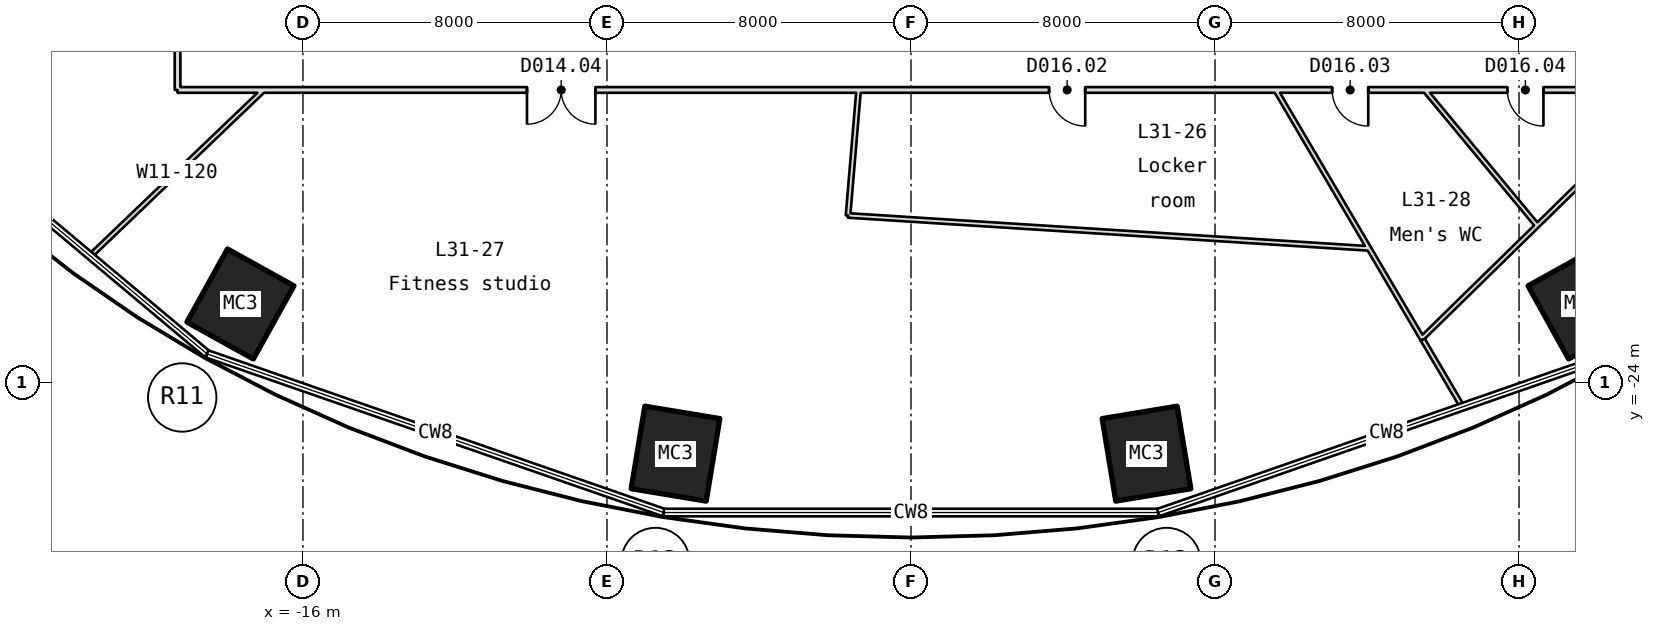
"""IFC4 building model, lengths in metres.
Left out: names, types, materials, properties, quantities, classifications, styles, units other than length and angle.
Written with IfcOpenShell. Run it as: python <this file> out.ifc"""

import sys

from ifc_helpers import new_model, si_unit, direction, frame, frame_2d, origin, origin_2d, place, context, subcontext, project, spatial, rectangle, hollow_rectangle, extrude, element, fill, save


model = new_model("IFC4")
c1 = context("Model", 3, precision=1e-05, world=origin(), true_north=direction((0.0, 1.0)))
c2 = subcontext(c1, "Body", "Model", "MODEL_VIEW")
j1 = project(units=[si_unit("LENGTHUNIT", "METRE"), si_unit("PLANEANGLEUNIT", "RADIAN")], contexts=[c1])
p1 = place(None, origin())
s1 = spatial("IfcSite", under=j1, at=p1, CompositionType="ELEMENT")
p2 = place(p1, origin())
s2 = spatial("IfcBuilding", under=s1, at=p2, CompositionType="ELEMENT")
p3 = place(p2, frame((0.0, 0.0, 145.05)))
s3 = spatial("IfcBuildingStorey", under=s2, at=p3, CompositionType="ELEMENT", Elevation=145.05)
for number, where, z_axis, x_axis in (
    (1, (-17.646, -21.932, -0.2), (0.0, 0.0, 1.0), (-0.874, 0.485, 0.0)),
    (2, (-6.197, -25.87, -0.2), (0.0, 0.0, 1.0), (-0.987, 0.163, 0.0)),
    (3, (6.197, -25.87, -0.2), (0.0, 0.0, 1.0), (-0.987, -0.163, 0.0)),
    (4, (17.646, -21.932, -0.2), (0.0, 0.0, 1.0), (-0.874, -0.485, 0.0)),
):
    element("IfcColumn", number, at=place(p3, frame(where, z_axis=z_axis, x_axis=x_axis)), inside=s3, PredefinedType="COLUMN", context=c2, shape_type="SweptSolid", body=[
        extrude(hollow_rectangle(XDim=2.0, YDim=2.2, WallThickness=0.08, at=origin_2d()), origin(), (0.0, 0.0, 1.0), 4.5),
    ])
p4 = place(p3, frame((-19.3, -16.3, 0.0), z_axis=(0.0, 0.0, 1.0), x_axis=(0.0, 1.0, 0.0)))
e5 = element("IfcWall", 5, at=p4, inside=s3, PredefinedType="PARTITIONING", context=c2, shape_type="SweptSolid", body=[
    extrude(rectangle(XDim=32.6, YDim=0.15, at=frame_2d((16.3, 0.0))), origin(), (0.0, 0.0, 1.0), 4.3),
])
p5 = place(p4, frame((16.446, 0.0, 0.0)))
e6 = element("IfcOpeningElement", 6, at=p5, cuts=e5, PredefinedType="OPENING", context=c2, shape_type="SweptSolid", body=[
    extrude(rectangle(XDim=0.95, YDim=2.1, at=frame_2d((0.475, 1.05))), frame((0.0, 0.085, 0.0), z_axis=(0.0, -1.0, 0.0), x_axis=(1.0, 0.0, 0.0)), (0.0, 0.0, 1.0), 0.17),
])
p6 = place(p4, frame((5.127, 0.0, 0.0)))
e7 = element("IfcOpeningElement", 7, at=p6, cuts=e5, PredefinedType="OPENING", context=c2, shape_type="SweptSolid", body=[
    extrude(rectangle(XDim=1.8, YDim=2.1, at=frame_2d((0.9, 1.05))), frame((0.0, 0.085, 0.0), z_axis=(0.0, -1.0, 0.0), x_axis=(1.0, 0.0, 0.0)), (0.0, 0.0, 1.0), 0.17),
])
p7 = place(p4, frame((25.047, 0.0, 0.0)))
e8 = element("IfcOpeningElement", 8, at=p7, cuts=e5, PredefinedType="OPENING", context=c2, shape_type="SweptSolid", body=[
    extrude(rectangle(XDim=0.95, YDim=2.1, at=frame_2d((0.475, 1.05))), frame((0.0, 0.085, 0.0), z_axis=(0.0, -1.0, 0.0), x_axis=(1.0, 0.0, 0.0)), (0.0, 0.0, 1.0), 0.17),
])
p8 = place(p3, frame((-17.033, -16.3, 0.0), z_axis=(0.0, 0.0, 1.0), x_axis=(-0.722489933703, -0.691381440088, 0.0)))
e9 = element("IfcWall", 9, at=p8, inside=s3, PredefinedType="PARTITIONING", context=c2, shape_type="SweptSolid", body=[
    extrude(rectangle(XDim=6.318, YDim=0.12, at=frame_2d((3.159, 0.0))), origin(), (0.0, 0.0, 1.0), 4.3),
])
p9 = place(p3, frame((-1.657, -19.602, 0.0), z_axis=(0.0, 0.0, 1.0), x_axis=(0.998001070526, -0.063197019139, 0.0)))
e10 = element("IfcWall", 10, at=p9, inside=s3, PredefinedType="PARTITIONING", context=c2, shape_type="SweptSolid", body=[
    extrude(rectangle(XDim=13.737, YDim=0.12, at=frame_2d((6.869, 0.0))), origin(), (0.0, 0.0, 1.0), 4.3),
])
p10 = place(p3, frame((-1.657, -19.602, 0.0), z_axis=(0.0, 0.0, 1.0), x_axis=(0.084283140238, 0.996441845906, 0.0)))
e11 = element("IfcWall", 11, at=p10, inside=s3, PredefinedType="PARTITIONING", context=c2, shape_type="SweptSolid", body=[
    extrude(rectangle(XDim=3.314, YDim=0.12, at=frame_2d((1.657, 0.0))), origin(), (0.0, 0.0, 1.0), 4.3),
])
p11 = place(p3, frame((9.597, -16.3, 0.0), z_axis=(0.0, 0.0, 1.0), x_axis=(0.507388266695, -0.861717556291, 0.0)))
e12 = element("IfcWall", 12, at=p11, inside=s3, PredefinedType="PARTITIONING", context=c2, shape_type="SweptSolid", body=[
    extrude(rectangle(XDim=7.621, YDim=0.12, at=frame_2d((3.811, 0.0))), origin(), (0.0, 0.0, 1.0), 3.756),
])
p12 = place(p3, frame((13.464, -22.867, 0.0), z_axis=(0.0, 0.0, 1.0), x_axis=(0.507357212344, -0.861735840662, 0.0)))
e13 = element("IfcWall", 13, at=p12, inside=s3, PredefinedType="PARTITIONING", context=c2, shape_type="SweptSolid", body=[
    extrude(rectangle(XDim=2.057, YDim=0.12, at=frame_2d((1.029, 0.0))), origin(), (0.0, 0.0, 1.0), 4.3),
])
p13 = place(p3, frame((13.446, -22.836, 0.0), z_axis=(0.0, 0.0, 1.0), x_axis=(0.714591635615, 0.699541846003, 0.0)))
e14 = element("IfcWall", 14, at=p13, inside=s3, PredefinedType="PARTITIONING", context=c2, shape_type="SweptSolid", body=[
    extrude(rectangle(XDim=16.969, YDim=0.12, at=frame_2d((8.484, 0.0))), origin(), (0.0, 0.0, 1.0), 4.3),
])
p14 = place(p3, frame((16.477, -19.868, 0.0), z_axis=(0.0, 0.0, 1.0), x_axis=(-0.638348808276, 0.769747230572, 0.0)))
e15 = element("IfcWall", 15, at=p14, inside=s3, PredefinedType="PARTITIONING", context=c2, shape_type="SweptSolid", body=[
    extrude(rectangle(XDim=4.636, YDim=0.12, at=frame_2d((2.318, 0.0))), origin(), (0.0, 0.0, 1.0), 4.3),
])
p15 = place(p3, frame((19.3, -16.3, 0.0), z_axis=(0.0, 0.0, 1.0), x_axis=(-1.0, 0.0, 0.0)))
e16 = element("IfcWall", 16, at=p15, inside=s3, PredefinedType="PARTITIONING", context=c2, shape_type="SweptSolid", body=[
    extrude(rectangle(XDim=38.6, YDim=0.15, at=frame_2d((19.3, 0.0))), origin(), (0.0, 0.0, 1.0), 4.3),
])
p16 = place(p15, frame((14.716, 0.0, 0.0)))
e17 = element("IfcOpeningElement", 17, at=p16, cuts=e16, PredefinedType="OPENING", context=c2, shape_type="SweptSolid", body=[
    extrude(rectangle(XDim=0.95, YDim=2.1, at=frame_2d((0.475, 1.05))), frame((0.0, 0.085, 0.0), z_axis=(0.0, -1.0, 0.0), x_axis=(1.0, 0.0, 0.0)), (0.0, 0.0, 1.0), 0.17),
])
p17 = place(p15, frame((27.605, 0.0, 0.0)))
e18 = element("IfcOpeningElement", 18, at=p17, cuts=e16, PredefinedType="OPENING", context=c2, shape_type="SweptSolid", body=[
    extrude(rectangle(XDim=1.8, YDim=2.1, at=frame_2d((0.9, 1.05))), frame((0.0, 0.085, 0.0), z_axis=(0.0, -1.0, 0.0), x_axis=(1.0, 0.0, 0.0)), (0.0, 0.0, 1.0), 0.17),
])
p18 = place(p15, frame((7.268, 0.0, 0.0)))
e19 = element("IfcOpeningElement", 19, at=p18, cuts=e16, PredefinedType="OPENING", context=c2, shape_type="SweptSolid", body=[
    extrude(rectangle(XDim=0.95, YDim=2.1, at=frame_2d((0.475, 1.05))), frame((0.0, 0.085, 0.0), z_axis=(0.0, -1.0, 0.0), x_axis=(1.0, 0.0, 0.0)), (0.0, 0.0, 1.0), 0.17),
])
p19 = place(p15, frame((2.658, 0.0, 0.0)))
e20 = element("IfcOpeningElement", 20, at=p19, cuts=e16, PredefinedType="OPENING", context=c2, shape_type="SweptSolid", body=[
    extrude(rectangle(XDim=0.95, YDim=2.1, at=frame_2d((0.475, 1.05))), frame((0.0, 0.085, 0.0), z_axis=(0.0, -1.0, 0.0), x_axis=(1.0, 0.0, 0.0)), (0.0, 0.0, 1.0), 0.17),
])
p20 = place(p16, origin())
e21 = element("IfcDoor", 21, at=p20, inside=s3, OperationType="SINGLE_SWING_RIGHT", PredefinedType="DOOR", context=c2, shape_type="SweptSolid", body=[
    extrude(rectangle(XDim=0.95, YDim=2.1, at=frame_2d((0.475, 1.05))), frame((0.0, 0.025, 0.0), z_axis=(0.0, -1.0, 0.0), x_axis=(1.0, 0.0, 0.0)), (0.0, 0.0, 1.0), 0.05),
])
fill(e17, e21)
p21 = place(p17, origin())
e22 = element("IfcDoor", 22, at=p21, inside=s3, OperationType="DOUBLE_DOOR_SINGLE_SWING", PredefinedType="DOOR", context=c2, shape_type="SweptSolid", body=[
    extrude(rectangle(XDim=1.8, YDim=2.1, at=frame_2d((0.9, 1.05))), frame((0.0, 0.025, 0.0), z_axis=(0.0, -1.0, 0.0), x_axis=(1.0, 0.0, 0.0)), (0.0, 0.0, 1.0), 0.05),
])
fill(e18, e22)
p22 = place(p18, origin())
e23 = element("IfcDoor", 23, at=p22, inside=s3, OperationType="SINGLE_SWING_RIGHT", PredefinedType="DOOR", context=c2, shape_type="SweptSolid", body=[
    extrude(rectangle(XDim=0.95, YDim=2.1, at=frame_2d((0.475, 1.05))), frame((0.0, 0.025, 0.0), z_axis=(0.0, -1.0, 0.0), x_axis=(1.0, 0.0, 0.0)), (0.0, 0.0, 1.0), 0.05),
])
fill(e19, e23)
p23 = place(p19, origin())
e24 = element("IfcDoor", 24, at=p23, inside=s3, OperationType="SINGLE_SWING_RIGHT", PredefinedType="DOOR", context=c2, shape_type="SweptSolid", body=[
    extrude(rectangle(XDim=0.95, YDim=2.1, at=frame_2d((0.475, 1.05))), frame((0.0, 0.025, 0.0), z_axis=(0.0, -1.0, 0.0), x_axis=(1.0, 0.0, 0.0)), (0.0, 0.0, 1.0), 0.05),
])
fill(e20, e24)
save(model, sys.argv[1])
